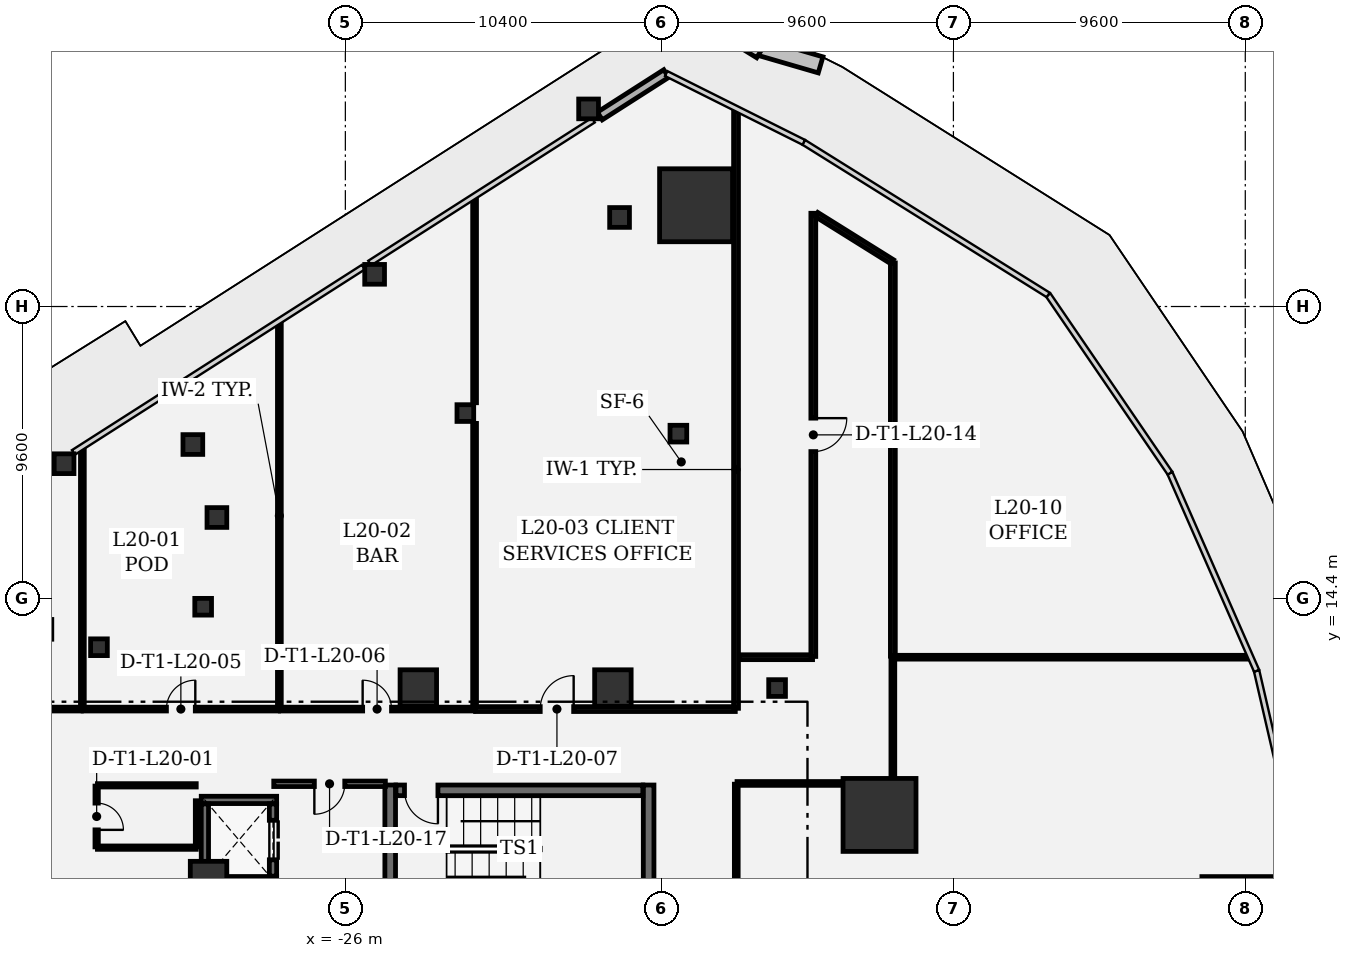
"""IFC4 building model, lengths in metres.
Left out: names, types, materials, properties, quantities, classifications, styles, units other than length and angle.
Written with IfcOpenShell. Run it as: python <this file> out.ifc"""

import sys

from ifc_helpers import new_model, si_unit, direction, frame, frame_2d, origin, origin_2d, place, context, subcontext, project, spatial, rectangle, extrude, element, fill, save


model = new_model("IFC4")
c1 = context("Model", 3, precision=1e-05, world=origin(), true_north=direction((0.0, 1.0)))
c2 = subcontext(c1, "Body", "Model", "MODEL_VIEW")
j1 = project(units=[si_unit("LENGTHUNIT", "METRE"), si_unit("PLANEANGLEUNIT", "RADIAN")], contexts=[c1])
p1 = place(None, origin())
s1 = spatial("IfcSite", under=j1, at=p1, CompositionType="ELEMENT")
p2 = place(p1, origin())
s2 = spatial("IfcBuilding", under=s1, at=p2, CompositionType="ELEMENT")
p3 = place(p2, frame((0.0, 0.0, 91.2)))
s3 = spatial("IfcBuildingStorey", under=s2, at=p3, CompositionType="ELEMENT", Elevation=91.2)
for number, where, z_axis, x_axis in (
    (1, (-8.43, 7.276, 0.0), (0.0, 0.0, 1.0), (1.0, 0.0, 0.0)),
    (2, (-14.464, 27.331, 0.0), (0.0, 0.0, 1.0), (1.0, 0.0, 0.0)),
):
    element("IfcColumn", number, at=place(p3, frame(where, z_axis=z_axis, x_axis=x_axis)), inside=s3, PredefinedType="COLUMN", context=c2, shape_type="SweptSolid", body=[
        extrude(rectangle(XDim=2.4, YDim=2.4, at=origin_2d()), origin(), (0.0, 0.0, 1.0), 4.2),
    ])
for number, where, z_axis, x_axis in (
    (3, (-23.6, 11.45, 0.0), (0.0, 0.0, 1.0), (1.0, 0.0, 0.0)),
    (4, (-17.2, 11.45, 0.0), (0.0, 0.0, 1.0), (1.0, 0.0, 0.0)),
    (5, (-30.5, 5.15, 0.0), (0.0, 0.0, 1.0), (1.0, 0.0, 0.0)),
):
    element("IfcColumn", number, at=place(p3, frame(where, z_axis=z_axis, x_axis=x_axis)), inside=s3, PredefinedType="COLUMN", context=c2, shape_type="SweptSolid", body=[
        extrude(rectangle(XDim=1.2, YDim=1.2, at=origin_2d()), origin(), (0.0, 0.0, 1.0), 4.2),
    ])
for number, where, z_axis, x_axis in (
    (6, (-18.0, 30.5, 0.0), (0.0, 0.0, 1.0), (1.0, 0.0, 0.0)),
    (7, (-35.252, 18.829, 0.0), (0.0, 0.0, 1.0), (1.0, 0.0, 0.0)),
    (8, (-25.038, 25.059, 0.0), (0.0, 0.0, 1.0), (1.0, 0.0, 0.0)),
    (9, (-31.016, 19.46, 0.0), (0.0, 0.0, 1.0), (1.0, 0.0, 0.0)),
    (10, (-16.981, 26.929, 0.0), (0.0, 0.0, 1.0), (1.0, 0.0, 0.0)),
    (11, (-30.225, 17.06, 0.0), (0.0, 0.0, 1.0), (1.0, 0.0, 0.0)),
):
    element("IfcColumn", number, at=place(p3, frame(where, z_axis=z_axis, x_axis=x_axis)), inside=s3, PredefinedType="COLUMN", context=c2, shape_type="SweptSolid", body=[
        extrude(rectangle(XDim=0.65, YDim=0.65, at=origin_2d()), origin(), (0.0, 0.0, 1.0), 4.2),
    ])
for number, where, z_axis, x_axis in (
    (12, (-34.104, 12.792, 0.0), (0.0, 0.0, 1.0), (1.0, 0.0, 0.0)),
    (13, (-22.053, 20.495, 0.0), (0.0, 0.0, 1.0), (1.0, 0.0, 0.0)),
    (14, (-30.677, 14.124, 0.0), (0.0, 0.0, 1.0), (1.0, 0.0, 0.0)),
    (15, (-15.046, 19.818, 0.0), (0.0, 0.0, 1.0), (1.0, 0.0, 0.0)),
    (16, (-11.8, 11.45, 0.0), (0.0, 0.0, 1.0), (1.0, 0.0, 0.0)),
):
    element("IfcColumn", number, at=place(p3, frame(where, z_axis=z_axis, x_axis=x_axis)), inside=s3, PredefinedType="COLUMN", context=c2, shape_type="SweptSolid", body=[
        extrude(rectangle(XDim=0.55, YDim=0.55, at=origin_2d()), origin(), (0.0, 0.0, 1.0), 4.2),
    ])
p4 = place(p3, frame((2.172, 5.098, 0.0), z_axis=(0.0, 0.0, 1.0), x_axis=(1.0, 0.0, 0.0)))
e17 = element("IfcWall", 17, at=p4, inside=s3, PredefinedType="SOLIDWALL", context=c2, shape_type="SweptSolid", body=[
    extrude(rectangle(XDim=3.398, YDim=0.3, at=frame_2d((1.699, 0.0))), origin(), (0.0, 0.0, 1.0), 3.92),
])
p5 = place(p3, frame((-17.63, 30.266, 0.0), z_axis=(0.0, 0.0, 1.0), x_axis=(0.84258941289, 0.538556479198, 0.0)))
e18 = element("IfcWall", 18, at=p5, inside=s3, PredefinedType="SOLIDWALL", context=c2, shape_type="SweptSolid", body=[
    extrude(rectangle(XDim=2.592, YDim=0.3, at=frame_2d((1.296, 0.0))), origin(), (0.0, 0.0, 1.0), 3.92),
])
for number, where, z_axis, x_axis in (
    (19, (-24.525, 8.26, 0.0), (0.0, 0.0, 1.0), (0.0, -1.0, 0.0)),
    (20, (-16.025, 4.05, 0.0), (0.0, 0.0, 1.0), (0.0, 1.0, 0.0)),
):
    element("IfcWall", number, at=place(p3, frame(where, z_axis=z_axis, x_axis=x_axis)), inside=s3, PredefinedType="SHEAR", context=c2, shape_type="SweptSolid", body=[
        extrude(rectangle(XDim=4.21, YDim=0.35, at=frame_2d((2.105, 0.0))), origin(), (0.0, 0.0, 1.0), 3.92),
    ])
p6 = place(p3, frame((-16.215, 8.085, 0.0), z_axis=(0.0, 0.0, 1.0), x_axis=(-1.0, 0.0, 0.0)))
e21 = element("IfcWall", 21, at=p6, inside=s3, PredefinedType="SHEAR", context=c2, shape_type="SweptSolid", body=[
    extrude(rectangle(XDim=8.12, YDim=0.35, at=frame_2d((4.06, 0.0))), origin(), (0.0, 0.0, 1.0), 3.92),
])
p7 = place(p6, frame((6.74, 0.0, 0.0)))
e22 = element("IfcOpeningElement", 22, at=p7, cuts=e21, PredefinedType="OPENING", context=c2, shape_type="SweptSolid", body=[
    extrude(rectangle(XDim=1.1, YDim=2.2, at=frame_2d((0.55, 1.1))), frame((0.0, 0.185, 0.0), z_axis=(0.0, -1.0, 0.0), x_axis=(1.0, 0.0, 0.0)), (0.0, 0.0, 1.0), 0.37),
])
for number, where, z_axis, x_axis in (
    (23, (-28.26, 5.13, 0.0), (0.0, 0.0, 1.0), (-1.0, 0.0, 0.0)),
    (24, (-30.74, 7.77, 0.0), (0.0, 0.0, 1.0), (1.0, 0.0, 0.0)),
):
    element("IfcWall", number, at=place(p3, frame(where, z_axis=z_axis, x_axis=x_axis)), inside=s3, PredefinedType="SHEAR", context=c2, shape_type="SweptSolid", body=[
        extrude(rectangle(XDim=2.48, YDim=0.24, at=frame_2d((1.24, 0.0))), origin(), (0.0, 0.0, 1.0), 3.92),
    ])
p8 = place(p3, frame((-30.62, 5.262, 0.0), z_axis=(0.0, 0.0, 1.0), x_axis=(0.0, 1.0, 0.0)))
e25 = element("IfcWall", 25, at=p8, inside=s3, PredefinedType="SHEAR", context=c2, shape_type="SweptSolid", body=[
    extrude(rectangle(XDim=2.376, YDim=0.24, at=frame_2d((1.188, 0.0))), origin(), (0.0, 0.0, 1.0), 3.92),
])
p9 = place(p3, frame((-28.38, 7.638, 0.0), z_axis=(0.0, 0.0, 1.0), x_axis=(0.0, -1.0, 0.0)))
e26 = element("IfcWall", 26, at=p9, inside=s3, PredefinedType="SHEAR", context=c2, shape_type="SweptSolid", body=[
    extrude(rectangle(XDim=2.376, YDim=0.24, at=frame_2d((1.188, 0.0))), origin(), (0.0, 0.0, 1.0), 3.92),
])
p10 = place(p9, frame((0.538, 0.0, 0.0)))
e27 = element("IfcOpeningElement", 27, at=p10, cuts=e26, PredefinedType="OPENING", context=c2, shape_type="SweptSolid", body=[
    extrude(rectangle(XDim=1.3, YDim=2.3, at=frame_2d((0.65, 1.15))), frame((0.0, 0.13, 0.0), z_axis=(0.0, -1.0, 0.0), x_axis=(1.0, 0.0, 0.0)), (0.0, 0.0, 1.0), 0.26),
])
p11 = place(p3, frame((-24.684, 8.3, 0.0), z_axis=(0.0, 0.0, 1.0), x_axis=(-1.0, 0.0, 0.0)))
e28 = element("IfcWall", 28, at=p11, inside=s3, PredefinedType="PARTITIONING", context=c2, shape_type="SweptSolid", body=[
    extrude(rectangle(XDim=3.671, YDim=0.18, at=frame_2d((1.835, 0.0))), origin(), (0.0, 0.0, 1.0), 3.92),
])
p12 = place(p11, frame((1.335, 0.0, 0.0)))
e29 = element("IfcOpeningElement", 29, at=p12, cuts=e28, PredefinedType="OPENING", context=c2, shape_type="SweptSolid", body=[
    extrude(rectangle(XDim=1.0, YDim=2.15, at=frame_2d((0.5, 1.075))), frame((0.0, 0.1, 0.0), z_axis=(0.0, -1.0, 0.0), x_axis=(1.0, 0.0, 0.0)), (0.0, 0.0, 1.0), 0.2),
])
p13 = place(p3, frame((-34.18, 8.225, 0.0), z_axis=(0.0, 0.0, 1.0), x_axis=(0.0, -1.0, 0.0)))
e30 = element("IfcWall", 30, at=p13, inside=s3, PredefinedType="PARTITIONING", context=c2, shape_type="SweptSolid", body=[
    extrude(rectangle(XDim=2.0, YDim=0.11, at=frame_2d((1.0, 0.0))), origin(), (0.0, 0.0, 1.0), 3.92),
])
p14 = place(p13, frame((0.56, 0.0, 0.0)))
e31 = element("IfcOpeningElement", 31, at=p14, cuts=e30, PredefinedType="OPENING", context=c2, shape_type="SweptSolid", body=[
    extrude(rectangle(XDim=0.88, YDim=2.1, at=frame_2d((0.44, 1.05))), frame((0.0, 0.065, 0.0), z_axis=(0.0, -1.0, 0.0), x_axis=(1.0, 0.0, 0.0)), (0.0, 0.0, 1.0), 0.13),
])
p15 = place(p3, frame((-34.155, 6.2, 0.0), z_axis=(0.0, 0.0, 1.0), x_axis=(1.0, 0.0, 0.0)))
e32 = element("IfcWall", 32, at=p15, inside=s3, PredefinedType="PARTITIONING", context=c2, shape_type="SweptSolid", body=[
    extrude(rectangle(XDim=3.25, YDim=0.11, at=frame_2d((1.625, 0.0))), origin(), (0.0, 0.0, 1.0), 3.433),
])
p16 = place(p3, frame((-30.88, 6.225, 0.0), z_axis=(0.0, 0.0, 1.0), x_axis=(0.0, 1.0, 0.0)))
e33 = element("IfcWall", 33, at=p16, inside=s3, PredefinedType="PARTITIONING", context=c2, shape_type="SweptSolid", body=[
    extrude(rectangle(XDim=1.518, YDim=0.11, at=frame_2d((0.759, 0.0))), origin(), (0.0, 0.0, 1.0), 3.92),
])
p17 = place(p3, frame((-30.905, 8.25, 0.0), z_axis=(0.0, 0.0, 1.0), x_axis=(-1.0, 0.0, 0.0)))
e34 = element("IfcWall", 34, at=p17, inside=s3, PredefinedType="PARTITIONING", context=c2, shape_type="SweptSolid", body=[
    extrude(rectangle(XDim=3.25, YDim=0.11, at=frame_2d((1.625, 0.0))), origin(), (0.0, 0.0, 1.0), 3.92),
])
p18 = place(p3, frame((-34.625, 10.758, 0.0), z_axis=(0.0, 0.0, 1.0), x_axis=(1.0, 0.0, 0.0)))
e35 = element("IfcWall", 35, at=p18, inside=s3, PredefinedType="PARTITIONING", context=c2, shape_type="SweptSolid", body=[
    extrude(rectangle(XDim=6.43, YDim=0.125, at=frame_2d((3.215, 0.0))), origin(), (0.0, 0.0, 1.0), 3.433),
])
p19 = place(p18, frame((2.74, 0.0, 0.0)))
e36 = element("IfcOpeningElement", 36, at=p19, cuts=e35, PredefinedType="OPENING", context=c2, shape_type="SweptSolid", body=[
    extrude(rectangle(XDim=0.95, YDim=2.15, at=frame_2d((0.475, 1.075))), frame((0.0, 0.073, 0.0), z_axis=(0.0, -1.0, 0.0), x_axis=(1.0, 0.0, 0.0)), (0.0, 0.0, 1.0), 0.145),
])
p20 = place(p3, frame((-28.17, 10.783, 0.0), z_axis=(0.0, 0.0, 1.0), x_axis=(0.0, 1.0, 0.0)))
e37 = element("IfcWall", 37, at=p20, inside=s3, PredefinedType="PARTITIONING", context=c2, shape_type="SweptSolid", body=[
    extrude(rectangle(XDim=12.667, YDim=0.125, at=frame_2d((6.333, 0.0))), origin(), (0.0, 0.0, 1.0), 3.433),
])
p21 = place(p3, frame((-34.65, 19.308, 0.0), z_axis=(0.0, 0.0, 1.0), x_axis=(0.0, -1.0, 0.0)))
e38 = element("IfcWall", 38, at=p21, inside=s3, PredefinedType="PARTITIONING", context=c2, shape_type="SweptSolid", body=[
    extrude(rectangle(XDim=8.525, YDim=0.125, at=frame_2d((4.263, 0.0))), origin(), (0.0, 0.0, 1.0), 3.92),
])
p22 = place(p3, frame((-28.138, 10.758, 0.0), z_axis=(0.0, 0.0, 1.0), x_axis=(1.0, 0.0, 0.0)))
e39 = element("IfcWall", 39, at=p22, inside=s3, PredefinedType="PARTITIONING", context=c2, shape_type="SweptSolid", body=[
    extrude(rectangle(XDim=6.363, YDim=0.125, at=frame_2d((3.182, 0.0))), origin(), (0.0, 0.0, 1.0), 3.92),
])
p23 = place(p22, frame((2.707, 0.0, 0.0)))
e40 = element("IfcOpeningElement", 40, at=p23, cuts=e39, PredefinedType="OPENING", context=c2, shape_type="SweptSolid", body=[
    extrude(rectangle(XDim=0.95, YDim=2.15, at=frame_2d((0.475, 1.075))), frame((0.0, 0.073, 0.0), z_axis=(0.0, -1.0, 0.0), x_axis=(1.0, 0.0, 0.0)), (0.0, 0.0, 1.0), 0.145),
])
p24 = place(p3, frame((-21.75, 10.783, 0.0), z_axis=(0.0, 0.0, 1.0), x_axis=(0.0, 1.0, 0.0)))
e41 = element("IfcWall", 41, at=p24, inside=s3, PredefinedType="PARTITIONING", context=c2, shape_type="SweptSolid", body=[
    extrude(rectangle(XDim=9.372, YDim=0.125, at=frame_2d((4.686, 0.0))), origin(), (0.0, 0.0, 1.0), 2.957),
])
p25 = place(p3, frame((-21.75, 20.835, 0.0), z_axis=(0.0, 0.0, 1.0), x_axis=(0.0, 1.0, 0.0)))
e42 = element("IfcWall", 42, at=p25, inside=s3, PredefinedType="PARTITIONING", context=c2, shape_type="SweptSolid", body=[
    extrude(rectangle(XDim=6.719, YDim=0.125, at=frame_2d((3.359, 0.0))), origin(), (0.0, 0.0, 1.0), 3.92),
])
p26 = place(p3, frame((-21.717, 10.758, 0.0), z_axis=(0.0, 0.0, 1.0), x_axis=(1.0, 0.0, 0.0)))
e43 = element("IfcWall", 43, at=p26, inside=s3, PredefinedType="PARTITIONING", context=c2, shape_type="SweptSolid", body=[
    extrude(rectangle(XDim=8.542, YDim=0.16, at=frame_2d((4.271, 0.0))), origin(), (0.0, 0.0, 1.0), 2.957),
])
p27 = place(p26, frame((2.126, 0.0, 0.0)))
e44 = element("IfcOpeningElement", 44, at=p27, cuts=e43, PredefinedType="OPENING", context=c2, shape_type="SweptSolid", body=[
    extrude(rectangle(XDim=1.1, YDim=2.15, at=frame_2d((0.55, 1.075))), frame((0.0, 0.09, 0.0), z_axis=(0.0, -1.0, 0.0), x_axis=(1.0, 0.0, 0.0)), (0.0, 0.0, 1.0), 0.18),
])
p28 = place(p3, frame((-13.15, 10.783, 0.0), z_axis=(0.0, 0.0, 1.0), x_axis=(0.0, 1.0, 0.0)))
e45 = element("IfcWall", 45, at=p28, inside=s3, PredefinedType="PARTITIONING", context=c2, shape_type="SweptSolid", body=[
    extrude(rectangle(XDim=19.651, YDim=0.16, at=frame_2d((9.826, 0.0))), origin(), (0.0, 0.0, 1.0), 2.89),
])
p29 = place(p3, frame((3.696, 12.464, 0.0), z_axis=(0.0, 0.0, 1.0), x_axis=(-1.0, 0.0, 0.0)))
e46 = element("IfcWall", 46, at=p29, inside=s3, PredefinedType="PARTITIONING", context=c2, shape_type="SweptSolid", body=[
    extrude(rectangle(XDim=11.663, YDim=0.125, at=frame_2d((5.832, 0.0))), origin(), (0.0, 0.0, 1.0), 3.92),
])
p30 = place(p3, frame((-7.992, 12.439, 0.0), z_axis=(0.0, 0.0, 1.0), x_axis=(0.0, -1.0, 0.0)))
e47 = element("IfcWall", 47, at=p30, inside=s3, PredefinedType="PARTITIONING", context=c2, shape_type="SweptSolid", body=[
    extrude(rectangle(XDim=3.898, YDim=0.125, at=frame_2d((1.949, 0.0))), origin(), (0.0, 0.0, 1.0), 3.92),
])
p31 = place(p3, frame((-9.695, 8.312, 0.0), z_axis=(0.0, 0.0, 1.0), x_axis=(-1.0, 0.0, 0.0)))
e48 = element("IfcWall", 48, at=p31, inside=s3, PredefinedType="PARTITIONING", context=c2, shape_type="SweptSolid", body=[
    extrude(rectangle(XDim=3.422, YDim=0.125, at=frame_2d((1.711, 0.0))), origin(), (0.0, 0.0, 1.0), 2.957),
])
p32 = place(p3, frame((-13.142, 8.287, 0.0), z_axis=(0.0, 0.0, 1.0), x_axis=(0.0, -1.0, 0.0)))
e49 = element("IfcWall", 49, at=p32, inside=s3, PredefinedType="PARTITIONING", context=c2, shape_type="SweptSolid", body=[
    extrude(rectangle(XDim=12.357, YDim=0.125, at=frame_2d((6.179, 0.0))), origin(), (0.0, 0.0, 1.0), 3.92),
])
p33 = place(p32, frame((5.704, 0.0, 0.0)))
e50 = element("IfcOpeningElement", 50, at=p33, cuts=e49, PredefinedType="OPENING", context=c2, shape_type="SweptSolid", body=[
    extrude(rectangle(XDim=0.95, YDim=2.15, at=frame_2d((0.475, 1.075))), frame((0.0, 0.073, 0.0), z_axis=(0.0, -1.0, 0.0), x_axis=(1.0, 0.0, 0.0)), (0.0, 0.0, 1.0), 0.145),
])
p34 = place(p3, frame((-13.04, 12.464, 0.0), z_axis=(0.0, 0.0, 1.0), x_axis=(1.0, 0.0, 0.0)))
e51 = element("IfcWall", 51, at=p34, inside=s3, PredefinedType="PARTITIONING", context=c2, shape_type="SweptSolid", body=[
    extrude(rectangle(XDim=2.407, YDim=0.16, at=frame_2d((1.204, 0.0))), origin(), (0.0, 0.0, 1.0), 3.92),
])
p35 = place(p3, frame((-10.608, 27.067, 0.0), z_axis=(0.0, 0.0, 1.0), x_axis=(0.0, -1.0, 0.0)))
e52 = element("IfcWall", 52, at=p35, inside=s3, PredefinedType="PARTITIONING", context=c2, shape_type="SweptSolid", body=[
    extrude(rectangle(XDim=14.578, YDim=0.16, at=frame_2d((7.289, 0.0))), origin(), (0.0, 0.0, 1.0), 2.89),
])
p36 = place(p35, frame((6.739, 0.0, 0.0)))
e53 = element("IfcOpeningElement", 53, at=p36, cuts=e52, PredefinedType="OPENING", context=c2, shape_type="SweptSolid", body=[
    extrude(rectangle(XDim=1.1, YDim=2.15, at=frame_2d((0.55, 1.075))), frame((0.0, 0.09, 0.0), z_axis=(0.0, -1.0, 0.0), x_axis=(1.0, 0.0, 0.0)), (0.0, 0.0, 1.0), 0.18),
])
p37 = place(p3, frame((-8.013, 25.471, 0.0), z_axis=(0.0, 0.0, 1.0), x_axis=(-0.848208611734, 0.529662298998, 0.0)))
e54 = element("IfcWall", 54, at=p37, inside=s3, PredefinedType="PARTITIONING", context=c2, shape_type="SweptSolid", body=[
    extrude(rectangle(XDim=2.934, YDim=0.16, at=frame_2d((1.467, 0.0))), origin(), (0.0, 0.0, 1.0), 3.92),
])
p38 = place(p3, frame((-7.992, 25.433, 0.0), z_axis=(0.0, 0.0, 1.0), x_axis=(0.0, -1.0, 0.0)))
e55 = element("IfcWall", 55, at=p38, inside=s3, PredefinedType="PARTITIONING", context=c2, shape_type="SweptSolid", body=[
    extrude(rectangle(XDim=12.936, YDim=0.16, at=frame_2d((6.468, 0.0))), origin(), (0.0, 0.0, 1.0), 3.92),
])
p39 = place(p3, frame((-34.683, 10.758, 0.0), z_axis=(0.0, 0.0, 1.0), x_axis=(-1.0, 0.0, 0.0)))
e56 = element("IfcWall", 56, at=p39, inside=s3, PredefinedType="PARTITIONING", context=c2, shape_type="SweptSolid", body=[
    extrude(rectangle(XDim=5.95, YDim=0.125, at=frame_2d((2.975, 0.0))), origin(), (0.0, 0.0, 1.0), 3.433),
])
p40 = place(p7, origin())
e57 = element("IfcDoor", 57, at=p40, inside=s3, OperationType="SINGLE_SWING_LEFT", PredefinedType="DOOR", context=c2, shape_type="SweptSolid", body=[
    extrude(rectangle(XDim=1.1, YDim=2.2, at=frame_2d((0.55, 1.1))), frame((0.0, 0.025, 0.0), z_axis=(0.0, -1.0, 0.0), x_axis=(1.0, 0.0, 0.0)), (0.0, 0.0, 1.0), 0.05),
])
fill(e22, e57)
p41 = place(p10, origin())
e58 = element("IfcDoor", 58, at=p41, inside=s3, OperationType="DOUBLE_DOOR_SLIDING", PredefinedType="DOOR", context=c2, shape_type="SweptSolid", body=[
    extrude(rectangle(XDim=1.3, YDim=2.3, at=frame_2d((0.65, 1.15))), frame((0.0, 0.025, 0.0), z_axis=(0.0, -1.0, 0.0), x_axis=(1.0, 0.0, 0.0)), (0.0, 0.0, 1.0), 0.05),
])
fill(e27, e58)
p42 = place(p14, origin())
e59 = element("IfcDoor", 59, at=p42, inside=s3, OperationType="SINGLE_SWING_RIGHT", PredefinedType="DOOR", context=c2, shape_type="SweptSolid", body=[
    extrude(rectangle(XDim=0.88, YDim=2.1, at=frame_2d((0.44, 1.05))), frame((0.0, 0.025, 0.0), z_axis=(0.0, -1.0, 0.0), x_axis=(1.0, 0.0, 0.0)), (0.0, 0.0, 1.0), 0.05),
])
fill(e31, e59)
p43 = place(p19, origin())
e60 = element("IfcDoor", 60, at=p43, inside=s3, OperationType="SINGLE_SWING_RIGHT", PredefinedType="DOOR", context=c2, shape_type="SweptSolid", body=[
    extrude(rectangle(XDim=0.95, YDim=2.15, at=frame_2d((0.475, 1.075))), frame((0.0, 0.025, 0.0), z_axis=(0.0, -1.0, 0.0), x_axis=(1.0, 0.0, 0.0)), (0.0, 0.0, 1.0), 0.05),
])
fill(e36, e60)
p44 = place(p23, origin())
e61 = element("IfcDoor", 61, at=p44, inside=s3, OperationType="SINGLE_SWING_LEFT", PredefinedType="DOOR", context=c2, shape_type="SweptSolid", body=[
    extrude(rectangle(XDim=0.95, YDim=2.15, at=frame_2d((0.475, 1.075))), frame((0.0, 0.025, 0.0), z_axis=(0.0, -1.0, 0.0), x_axis=(1.0, 0.0, 0.0)), (0.0, 0.0, 1.0), 0.05),
])
fill(e40, e61)
p45 = place(p27, origin())
e62 = element("IfcDoor", 62, at=p45, inside=s3, OperationType="SINGLE_SWING_RIGHT", PredefinedType="DOOR", context=c2, shape_type="SweptSolid", body=[
    extrude(rectangle(XDim=1.1, YDim=2.15, at=frame_2d((0.55, 1.075))), frame((0.0, 0.025, 0.0), z_axis=(0.0, -1.0, 0.0), x_axis=(1.0, 0.0, 0.0)), (0.0, 0.0, 1.0), 0.05),
])
fill(e44, e62)
p46 = place(p36, origin())
e63 = element("IfcDoor", 63, at=p46, inside=s3, OperationType="SINGLE_SWING_LEFT", PredefinedType="DOOR", context=c2, shape_type="SweptSolid", body=[
    extrude(rectangle(XDim=1.1, YDim=2.15, at=frame_2d((0.55, 1.075))), frame((0.0, 0.025, 0.0), z_axis=(0.0, -1.0, 0.0), x_axis=(1.0, 0.0, 0.0)), (0.0, 0.0, 1.0), 0.05),
])
fill(e53, e63)
p47 = place(p12, origin())
e64 = element("IfcDoor", 64, at=p47, inside=s3, OperationType="SINGLE_SWING_RIGHT", PredefinedType="DOOR", context=c2, shape_type="SweptSolid", body=[
    extrude(rectangle(XDim=1.0, YDim=2.15, at=frame_2d((0.5, 1.075))), frame((0.0, 0.025, 0.0), z_axis=(0.0, -1.0, 0.0), x_axis=(1.0, 0.0, 0.0)), (0.0, 0.0, 1.0), 0.05),
])
fill(e29, e64)
save(model, sys.argv[1])
